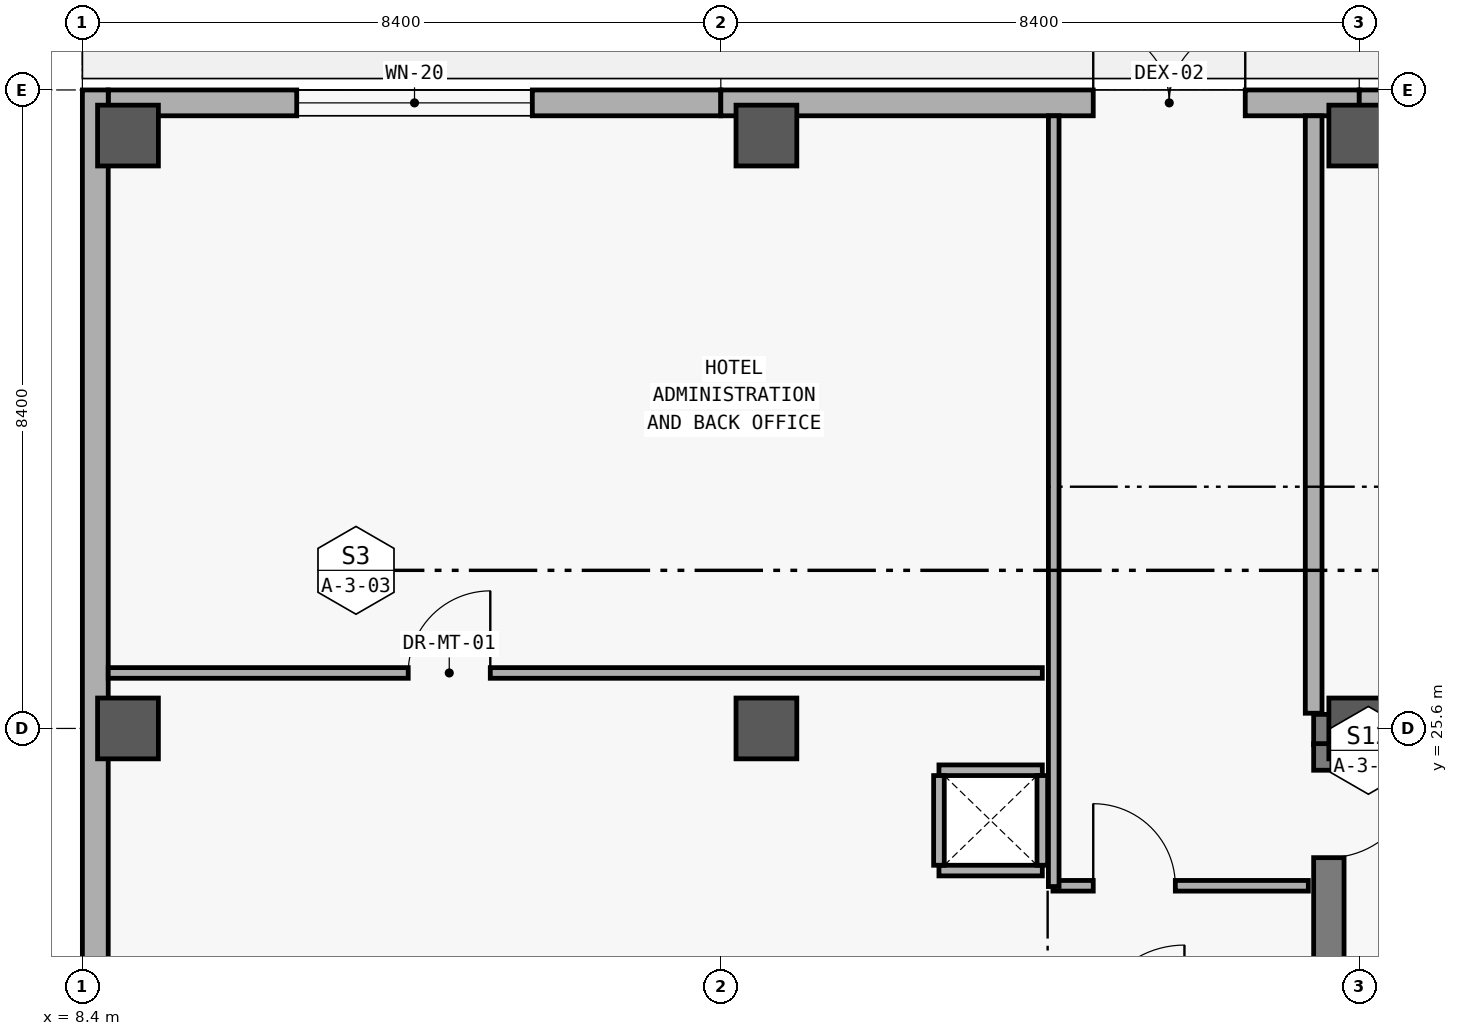
"""IFC4 building model, lengths in metres.
Left out: names, types, materials, properties, quantities, classifications, styles, units other than length and angle.
Written with IfcOpenShell. Run it as: python <this file> out.ifc"""

import sys

from ifc_helpers import new_model, si_unit, direction, frame, frame_2d, origin, origin_2d, place, context, subcontext, project, spatial, rectangle, extrude, element, fill, save


model = new_model("IFC4")
c1 = context("Model", 3, precision=1e-05, world=origin(), true_north=direction((0.0, 1.0)))
c2 = subcontext(c1, "Body", "Model", "MODEL_VIEW")
j1 = project(units=[si_unit("LENGTHUNIT", "METRE"), si_unit("PLANEANGLEUNIT", "RADIAN")], contexts=[c1])
p1 = place(None, origin())
s1 = spatial("IfcSite", under=j1, at=p1, CompositionType="ELEMENT")
p2 = place(p1, origin())
s2 = spatial("IfcBuilding", under=s1, at=p2, CompositionType="ELEMENT")
p3 = place(p2, origin())
s3 = spatial("IfcBuildingStorey", under=s2, at=p3, CompositionType="ELEMENT", Elevation=0.0)
for number, where, z_axis, x_axis in (
    (1, (9.0, 25.6, 0.0), (0.0, 0.0, 1.0), (1.0, 0.0, 0.0)),
    (2, (9.0, 33.4, 0.0), (0.0, 0.0, 1.0), (1.0, 0.0, 0.0)),
    (3, (17.4, 25.6, 0.0), (0.0, 0.0, 1.0), (1.0, 0.0, 0.0)),
    (4, (17.4, 33.4, 0.0), (0.0, 0.0, 1.0), (1.0, 0.0, 0.0)),
    (5, (25.2, 25.6, 0.0), (0.0, 0.0, 1.0), (1.0, 0.0, 0.0)),
    (6, (25.2, 33.4, 0.0), (0.0, 0.0, 1.0), (1.0, 0.0, 0.0)),
):
    element("IfcColumn", number, at=place(p3, frame(where, z_axis=z_axis, x_axis=x_axis)), inside=s3, PredefinedType="COLUMN", context=c2, shape_type="SweptSolid", body=[
        extrude(rectangle(XDim=0.8, YDim=0.8, at=origin_2d()), origin(), (0.0, 0.0, 1.0), 5.4),
    ])
p4 = place(p3, frame((8.74, 33.83, 0.0), z_axis=(0.0, 0.0, 1.0), x_axis=(1.0, 0.0, 0.0)))
e7 = element("IfcWall", 7, at=p4, inside=s3, PredefinedType="SOLIDWALL", context=c2, shape_type="SweptSolid", body=[
    extrude(rectangle(XDim=8.06, YDim=0.34, at=frame_2d((4.03, 0.0))), origin(), (0.0, 0.0, 1.0), 5.1),
])
p5 = place(p4, frame((2.48, 0.0, 0.9)))
e8 = element("IfcOpeningElement", 8, at=p5, cuts=e7, PredefinedType="OPENING", context=c2, shape_type="SweptSolid", body=[
    extrude(rectangle(XDim=3.1, YDim=2.2, at=frame_2d((1.55, 1.1))), frame((0.0, 0.18, 0.0), z_axis=(0.0, -1.0, 0.0), x_axis=(1.0, 0.0, 0.0)), (0.0, 0.0, 1.0), 0.36),
])
p6 = place(p3, frame((16.8, 33.83, 0.0), z_axis=(0.0, 0.0, 1.0), x_axis=(1.0, 0.0, 0.0)))
e9 = element("IfcWall", 9, at=p6, inside=s3, PredefinedType="SOLIDWALL", context=c2, shape_type="SweptSolid", body=[
    extrude(rectangle(XDim=8.4, YDim=0.34, at=frame_2d((4.2, 0.0))), origin(), (0.0, 0.0, 1.0), 5.1),
])
p7 = place(p6, frame((4.9, 0.0, 0.0)))
e10 = element("IfcOpeningElement", 10, at=p7, cuts=e9, PredefinedType="OPENING", context=c2, shape_type="SweptSolid", body=[
    extrude(rectangle(XDim=2.0, YDim=2.6, at=frame_2d((1.0, 1.3))), frame((0.0, 0.18, 0.0), z_axis=(0.0, -1.0, 0.0), x_axis=(1.0, 0.0, 0.0)), (0.0, 0.0, 1.0), 0.36),
])
p8 = place(p3, frame((25.2, 33.83, 0.0), z_axis=(0.0, 0.0, 1.0), x_axis=(1.0, 0.0, 0.0)))
e11 = element("IfcWall", 11, at=p8, inside=s3, PredefinedType="SOLIDWALL", context=c2, shape_type="SweptSolid", body=[
    extrude(rectangle(XDim=8.4, YDim=0.34, at=frame_2d((4.2, 0.0))), origin(), (0.0, 0.0, 1.0), 5.1),
])
p9 = place(p8, frame((2.65, 0.0, 0.9)))
e12 = element("IfcOpeningElement", 12, at=p9, cuts=e11, PredefinedType="OPENING", context=c2, shape_type="SweptSolid", body=[
    extrude(rectangle(XDim=3.1, YDim=2.2, at=frame_2d((1.55, 1.1))), frame((0.0, 0.18, 0.0), z_axis=(0.0, -1.0, 0.0), x_axis=(1.0, 0.0, 0.0)), (0.0, 0.0, 1.0), 0.36),
])
p10 = place(p3, frame((8.57, 6.0, 0.0), z_axis=(0.0, 0.0, 1.0), x_axis=(0.0, 1.0, 0.0)))
e13 = element("IfcWall", 13, at=p10, inside=s3, PredefinedType="SOLIDWALL", context=c2, shape_type="SweptSolid", body=[
    extrude(rectangle(XDim=28.0, YDim=0.34, at=frame_2d((14.0, 0.0))), origin(), (0.0, 0.0, 1.0), 5.1),
])
p11 = place(p10, frame((4.5, 0.0, 0.95)))
e14 = element("IfcOpeningElement", 14, at=p11, cuts=e13, PredefinedType="OPENING", context=c2, shape_type="SweptSolid", body=[
    extrude(rectangle(XDim=1.6, YDim=1.6, at=frame_2d((0.8, 0.8))), frame((0.0, 0.18, 0.0), z_axis=(0.0, -1.0, 0.0), x_axis=(1.0, 0.0, 0.0)), (0.0, 0.0, 1.0), 0.36),
])
p12 = place(p3, frame((33.8, 25.585, 0.0), z_axis=(0.0, 0.0, 1.0), x_axis=(-1.0, 0.0, 0.0)))
e15 = element("IfcWall", 15, at=p12, inside=s3, PredefinedType="SHEAR", context=c2, shape_type="SweptSolid", body=[
    extrude(rectangle(XDim=9.2, YDim=0.4, at=frame_2d((4.6, 0.0))), origin(), (0.0, 0.0, 1.0), 5.08),
])
p13 = place(p3, frame((24.8, 25.4, 0.0), z_axis=(0.0, 0.0, 1.0), x_axis=(0.0, -1.0, 0.0)))
e16 = element("IfcWall", 16, at=p13, inside=s3, PredefinedType="SHEAR", context=c2, shape_type="SweptSolid", body=[
    extrude(rectangle(XDim=7.4, YDim=0.4, at=frame_2d((3.7, 0.0))), origin(), (0.0, 0.0, 1.0), 5.08),
])
p14 = place(p13, frame((0.35, 0.0, 0.0)))
e17 = element("IfcOpeningElement", 17, at=p14, cuts=e16, PredefinedType="OPENING", context=c2, shape_type="SweptSolid", body=[
    extrude(rectangle(XDim=1.15, YDim=2.2, at=frame_2d((0.575, 1.1))), frame((0.0, 0.21, 0.0), z_axis=(0.0, -1.0, 0.0), x_axis=(1.0, 0.0, 0.0)), (0.0, 0.0, 1.0), 0.42),
])
p15 = place(p3, frame((21.17, 23.53, 0.0), z_axis=(0.0, 0.0, 1.0), x_axis=(1.0, 0.0, 0.0)))
e18 = element("IfcWall", 18, at=p15, inside=s3, PredefinedType="PARTITIONING", context=c2, shape_type="SweptSolid", body=[
    extrude(rectangle(XDim=3.36, YDim=0.14, at=frame_2d((1.68, 0.0))), origin(), (0.0, 0.0, 1.0), 4.18),
])
p16 = place(p15, frame((0.53, 0.0, 0.0)))
e19 = element("IfcOpeningElement", 19, at=p16, cuts=e18, PredefinedType="OPENING", context=c2, shape_type="SweptSolid", body=[
    extrude(rectangle(XDim=1.08, YDim=2.25, at=frame_2d((0.54, 1.125))), frame((0.0, 0.08, 0.0), z_axis=(0.0, -1.0, 0.0), x_axis=(1.0, 0.0, 0.0)), (0.0, 0.0, 1.0), 0.16),
])
p17 = place(p3, frame((8.74, 26.33, 0.0), z_axis=(0.0, 0.0, 1.0), x_axis=(1.0, 0.0, 0.0)))
e20 = element("IfcWall", 20, at=p17, inside=s3, PredefinedType="PARTITIONING", context=c2, shape_type="SweptSolid", body=[
    extrude(rectangle(XDim=12.29, YDim=0.14, at=frame_2d((6.145, 0.0))), origin(), (0.0, 0.0, 1.0), 4.18),
])
p18 = place(p17, frame((3.947, 0.0, 0.0)))
e21 = element("IfcOpeningElement", 21, at=p18, cuts=e20, PredefinedType="OPENING", context=c2, shape_type="SweptSolid", body=[
    extrude(rectangle(XDim=1.08, YDim=2.25, at=frame_2d((0.54, 1.125))), frame((0.0, 0.08, 0.0), z_axis=(0.0, -1.0, 0.0), x_axis=(1.0, 0.0, 0.0)), (0.0, 0.0, 1.0), 0.16),
])
p19 = place(p3, frame((21.18, 23.52, 0.0), z_axis=(0.0, 0.0, 1.0), x_axis=(0.0, 1.0, 0.0)))
e22 = element("IfcWall", 22, at=p19, inside=s3, PredefinedType="PARTITIONING", context=c2, shape_type="SweptSolid", body=[
    extrude(rectangle(XDim=10.14, YDim=0.14, at=frame_2d((5.07, 0.0))), origin(), (0.0, 0.0, 1.0), 4.18),
])
for number, where, z_axis, x_axis in (
    (23, (19.67, 23.73, 0.0), (0.0, 0.0, 1.0), (1.0, 0.0, 0.0)),
    (24, (21.03, 25.05, 0.0), (0.0, 0.0, 1.0), (-1.0, 0.0, 0.0)),
):
    element("IfcWall", number, at=place(p3, frame(where, z_axis=z_axis, x_axis=x_axis)), inside=s3, PredefinedType="PARTITIONING", context=c2, shape_type="SweptSolid", body=[
        extrude(rectangle(XDim=1.36, YDim=0.14, at=frame_2d((0.68, 0.0))), origin(), (0.0, 0.0, 1.0), 4.2),
    ])
for number, where, z_axis, x_axis in (
    (25, (19.67, 24.98, 0.0), (0.0, 0.0, 1.0), (0.0, -1.0, 0.0)),
    (26, (21.03, 23.8, 0.0), (0.0, 0.0, 1.0), (0.0, 1.0, 0.0)),
):
    element("IfcWall", number, at=place(p3, frame(where, z_axis=z_axis, x_axis=x_axis)), inside=s3, PredefinedType="PARTITIONING", context=c2, shape_type="SweptSolid", body=[
        extrude(rectangle(XDim=1.18, YDim=0.14, at=frame_2d((0.59, 0.0))), origin(), (0.0, 0.0, 1.0), 4.2),
    ])
p20 = place(p3, frame((24.6, 25.8, 0.0), z_axis=(0.0, 0.0, 1.0), x_axis=(0.0, 1.0, 0.0)))
e27 = element("IfcWall", 27, at=p20, inside=s3, PredefinedType="SOLIDWALL", context=c2, shape_type="SweptSolid", body=[
    extrude(rectangle(XDim=7.86, YDim=0.22, at=frame_2d((3.93, 0.0))), origin(), (0.0, 0.0, 1.0), 4.2),
])
p21 = place(p5, origin())
e28 = element("IfcWindow", 28, at=p21, inside=s3, PartitioningType="SINGLE_PANEL", PredefinedType="WINDOW", context=c2, shape_type="SweptSolid", body=[
    extrude(rectangle(XDim=3.1, YDim=2.2, at=frame_2d((1.55, 1.1))), frame((0.0, 0.03, 0.0), z_axis=(0.0, -1.0, 0.0), x_axis=(1.0, 0.0, 0.0)), (0.0, 0.0, 1.0), 0.06),
])
fill(e8, e28)
p22 = place(p7, origin())
e29 = element("IfcDoor", 29, at=p22, inside=s3, OperationType="DOUBLE_DOOR_SINGLE_SWING", PredefinedType="DOOR", context=c2, shape_type="SweptSolid", body=[
    extrude(rectangle(XDim=2.0, YDim=2.6, at=frame_2d((1.0, 1.3))), frame((0.0, 0.025, 0.0), z_axis=(0.0, -1.0, 0.0), x_axis=(1.0, 0.0, 0.0)), (0.0, 0.0, 1.0), 0.05),
])
fill(e10, e29)
p23 = place(p14, origin())
e30 = element("IfcDoor", 30, at=p23, inside=s3, OperationType="SINGLE_SWING_LEFT", PredefinedType="DOOR", context=c2, shape_type="SweptSolid", body=[
    extrude(rectangle(XDim=1.15, YDim=2.2, at=frame_2d((0.575, 1.1))), frame((0.0, 0.025, 0.0), z_axis=(0.0, -1.0, 0.0), x_axis=(1.0, 0.0, 0.0)), (0.0, 0.0, 1.0), 0.05),
])
fill(e17, e30)
p24 = place(p16, origin())
e31 = element("IfcDoor", 31, at=p24, inside=s3, OperationType="SINGLE_SWING_LEFT", PredefinedType="DOOR", context=c2, shape_type="SweptSolid", body=[
    extrude(rectangle(XDim=1.08, YDim=2.25, at=frame_2d((0.54, 1.125))), frame((0.0, 0.025, 0.0), z_axis=(0.0, -1.0, 0.0), x_axis=(1.0, 0.0, 0.0)), (0.0, 0.0, 1.0), 0.05),
])
fill(e19, e31)
p25 = place(p18, origin())
e32 = element("IfcDoor", 32, at=p25, inside=s3, OperationType="SINGLE_SWING_RIGHT", PredefinedType="DOOR", context=c2, shape_type="SweptSolid", body=[
    extrude(rectangle(XDim=1.08, YDim=2.25, at=frame_2d((0.54, 1.125))), frame((0.0, 0.025, 0.0), z_axis=(0.0, -1.0, 0.0), x_axis=(1.0, 0.0, 0.0)), (0.0, 0.0, 1.0), 0.05),
])
fill(e21, e32)
save(model, sys.argv[1])
